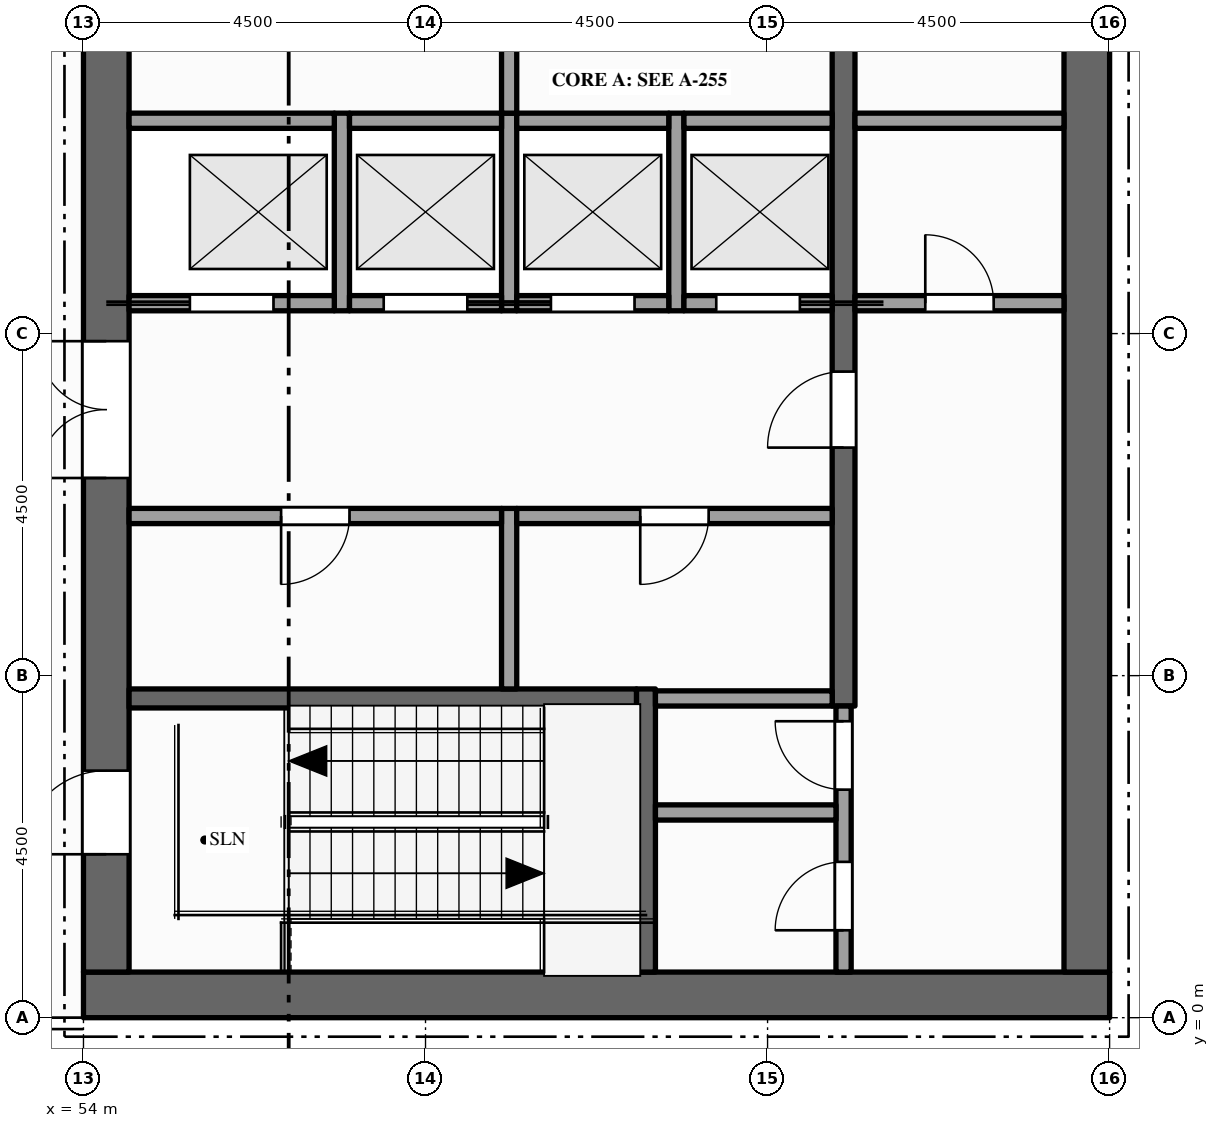
"""IFC4 building model, lengths in metres.
Left out: names, types, materials, properties, quantities, classifications, styles, units other than length and angle.
Written with IfcOpenShell. Run it as: python <this file> out.ifc"""

import sys

from ifc_helpers import new_model, si_unit, direction, frame, frame_2d, origin, place, context, subcontext, project, spatial, rectangle, extrude, element, fill, save


model = new_model("IFC4")
c1 = context("Model", 3, precision=1e-05, world=origin(), true_north=direction((0.0, 1.0)))
c2 = subcontext(c1, "Body", "Model", "MODEL_VIEW")
j1 = project(units=[si_unit("LENGTHUNIT", "METRE"), si_unit("PLANEANGLEUNIT", "RADIAN")], contexts=[c1])
p1 = place(None, origin())
s1 = spatial("IfcSite", under=j1, at=p1, CompositionType="ELEMENT")
p2 = place(p1, origin())
s2 = spatial("IfcBuilding", under=s1, at=p2, CompositionType="ELEMENT")
p3 = place(p2, frame((0.0, 0.0, 309.5)))
s3 = spatial("IfcBuildingStorey", under=s2, at=p3, CompositionType="ELEMENT", Elevation=309.5)
p4 = place(p3, frame((67.5, 0.3, -0.15), z_axis=(0.0, 0.0, 1.0), x_axis=(-1.0, 0.0, 0.0)))
e1 = element("IfcWall", 1, at=p4, inside=s3, PredefinedType="SHEAR", context=c2, shape_type="SweptSolid", body=[
    extrude(rectangle(XDim=13.5, YDim=0.6, at=frame_2d((6.75, 0.0))), origin(), (0.0, 0.0, 1.0), 4.5),
])
p5 = place(p3, frame((54.3, 0.6, -0.15), z_axis=(0.0, 0.0, 1.0), x_axis=(0.0, 1.0, 0.0)))
e2 = element("IfcWall", 2, at=p5, inside=s3, PredefinedType="SHEAR", context=c2, shape_type="SweptSolid", body=[
    extrude(rectangle(XDim=21.3, YDim=0.6, at=frame_2d((10.65, 0.0))), origin(), (0.0, 0.0, 1.0), 4.5),
])
p6 = place(p5, frame((6.5, 0.0, 0.15)))
e3 = element("IfcOpeningElement", 3, at=p6, cuts=e2, PredefinedType="OPENING", context=c2, shape_type="SweptSolid", body=[
    extrude(rectangle(XDim=1.8, YDim=2.1, at=frame_2d((0.9, 1.05))), frame((0.0, 0.31, 0.0), z_axis=(0.0, -1.0, 0.0), x_axis=(1.0, 0.0, 0.0)), (0.0, 0.0, 1.0), 0.62),
])
p7 = place(p5, frame((12.55, 0.0, 0.15)))
e4 = element("IfcOpeningElement", 4, at=p7, cuts=e2, PredefinedType="OPENING", context=c2, shape_type="SweptSolid", body=[
    extrude(rectangle(XDim=1.1, YDim=2.1, at=frame_2d((0.55, 1.05))), frame((0.0, 0.31, 0.0), z_axis=(0.0, -1.0, 0.0), x_axis=(1.0, 0.0, 0.0)), (0.0, 0.0, 1.0), 0.62),
])
p8 = place(p5, frame((1.55, 0.0, 0.15)))
e5 = element("IfcOpeningElement", 5, at=p8, cuts=e2, PredefinedType="OPENING", context=c2, shape_type="SweptSolid", body=[
    extrude(rectangle(XDim=1.1, YDim=2.1, at=frame_2d((0.55, 1.05))), frame((0.0, 0.31, 0.0), z_axis=(0.0, -1.0, 0.0), x_axis=(1.0, 0.0, 0.0)), (0.0, 0.0, 1.0), 0.62),
])
p9 = place(p5, frame((18.75, 0.0, 0.15)))
e6 = element("IfcOpeningElement", 6, at=p9, cuts=e2, PredefinedType="OPENING", context=c2, shape_type="SweptSolid", body=[
    extrude(rectangle(XDim=1.1, YDim=2.1, at=frame_2d((0.55, 1.05))), frame((0.0, 0.31, 0.0), z_axis=(0.0, -1.0, 0.0), x_axis=(1.0, 0.0, 0.0)), (0.0, 0.0, 1.0), 0.62),
])
p10 = place(p3, frame((67.2, 0.6, -0.15), z_axis=(0.0, 0.0, 1.0), x_axis=(0.0, 1.0, 0.0)))
e7 = element("IfcWall", 7, at=p10, inside=s3, PredefinedType="SHEAR", context=c2, shape_type="SweptSolid", body=[
    extrude(rectangle(XDim=21.3, YDim=0.6, at=frame_2d((10.65, 0.0))), origin(), (0.0, 0.0, 1.0), 4.5),
])
p11 = place(p3, frame((57.4, 9.3, 0.0), z_axis=(0.0, 0.0, 1.0), x_axis=(0.0, 1.0, 0.0)))
e8 = element("IfcWall", 8, at=p11, inside=s3, PredefinedType="SOLIDWALL", context=c2, shape_type="SweptSolid", body=[
    extrude(rectangle(XDim=2.6, YDim=0.2, at=frame_2d((1.3, 0.0))), origin(), (0.0, 0.0, 1.0), 4.35),
])
p12 = place(p3, frame((59.6, 4.325, 0.0), z_axis=(0.0, 0.0, 1.0), x_axis=(0.0, 1.0, 0.0)))
e9 = element("IfcWall", 9, at=p12, inside=s3, PredefinedType="PARTITIONING", context=c2, shape_type="SweptSolid", body=[
    extrude(rectangle(XDim=2.375, YDim=0.2, at=frame_2d((1.188, 0.0))), origin(), (0.0, 0.0, 1.0), 4.35),
])
p13 = place(p3, frame((59.6, 9.3, 0.0), z_axis=(0.0, 0.0, 1.0), x_axis=(0.0, 1.0, 0.0)))
e10 = element("IfcWall", 10, at=p13, inside=s3, PredefinedType="SOLIDWALL", context=c2, shape_type="SweptSolid", body=[
    extrude(rectangle(XDim=2.6, YDim=0.2, at=frame_2d((1.3, 0.0))), origin(), (0.0, 0.0, 1.0), 4.35),
])
p14 = place(p3, frame((59.6, 11.9, 0.0), z_axis=(0.0, 0.0, 1.0), x_axis=(0.0, 1.0, 0.0)))
e11 = element("IfcWall", 11, at=p14, inside=s3, PredefinedType="PARTITIONING", context=c2, shape_type="SweptSolid", body=[
    extrude(rectangle(XDim=3.6, YDim=0.2, at=frame_2d((1.8, 0.0))), origin(), (0.0, 0.0, 1.0), 4.35),
])
p15 = place(p14, frame((1.3, 0.0, 0.0)))
e12 = element("IfcOpeningElement", 12, at=p15, cuts=e11, PredefinedType="OPENING", context=c2, shape_type="SweptSolid", body=[
    extrude(rectangle(XDim=1.0, YDim=2.1, at=frame_2d((0.5, 1.05))), frame((0.0, 0.11, 0.0), z_axis=(0.0, -1.0, 0.0), x_axis=(1.0, 0.0, 0.0)), (0.0, 0.0, 1.0), 0.22),
])
p16 = place(p3, frame((61.4, 0.6, 0.0), z_axis=(0.0, 0.0, 1.0), x_axis=(0.0, 1.0, 0.0)))
e13 = element("IfcWall", 13, at=p16, inside=s3, PredefinedType="SHEAR", context=c2, shape_type="SweptSolid", body=[
    extrude(rectangle(XDim=3.725, YDim=0.25, at=frame_2d((1.862, 0.0))), origin(), (0.0, 0.0, 1.0), 4.35),
])
p17 = place(p3, frame((61.8, 9.3, 0.0), z_axis=(0.0, 0.0, 1.0), x_axis=(0.0, 1.0, 0.0)))
e14 = element("IfcWall", 14, at=p17, inside=s3, PredefinedType="SOLIDWALL", context=c2, shape_type="SweptSolid", body=[
    extrude(rectangle(XDim=2.6, YDim=0.2, at=frame_2d((1.3, 0.0))), origin(), (0.0, 0.0, 1.0), 4.35),
])
p18 = place(p3, frame((64.0, 0.6, 0.0), z_axis=(0.0, 0.0, 1.0), x_axis=(0.0, 1.0, 0.0)))
e15 = element("IfcWall", 15, at=p18, inside=s3, PredefinedType="PARTITIONING", context=c2, shape_type="SweptSolid", body=[
    extrude(rectangle(XDim=3.5, YDim=0.2, at=frame_2d((1.75, 0.0))), origin(), (0.0, 0.0, 1.0), 4.35),
])
p19 = place(p18, frame((0.55, 0.0, 0.0)))
e16 = element("IfcOpeningElement", 16, at=p19, cuts=e15, PredefinedType="OPENING", context=c2, shape_type="SweptSolid", body=[
    extrude(rectangle(XDim=0.9, YDim=2.1, at=frame_2d((0.45, 1.05))), frame((0.0, 0.11, 0.0), z_axis=(0.0, -1.0, 0.0), x_axis=(1.0, 0.0, 0.0)), (0.0, 0.0, 1.0), 0.22),
])
p20 = place(p18, frame((2.4, 0.0, 0.0)))
e17 = element("IfcOpeningElement", 17, at=p20, cuts=e15, PredefinedType="OPENING", context=c2, shape_type="SweptSolid", body=[
    extrude(rectangle(XDim=0.9, YDim=2.1, at=frame_2d((0.45, 1.05))), frame((0.0, 0.11, 0.0), z_axis=(0.0, -1.0, 0.0), x_axis=(1.0, 0.0, 0.0)), (0.0, 0.0, 1.0), 0.22),
])
p21 = place(p3, frame((64.0, 4.1, 0.0), z_axis=(0.0, 0.0, 1.0), x_axis=(0.0, 1.0, 0.0)))
e18 = element("IfcWall", 18, at=p21, inside=s3, PredefinedType="SHEAR", context=c2, shape_type="SweptSolid", body=[
    extrude(rectangle(XDim=14.5, YDim=0.3, at=frame_2d((7.25, 0.0))), origin(), (0.0, 0.0, 1.0), 4.35),
])
p22 = place(p21, frame((3.4, 0.0, 0.0)))
e19 = element("IfcOpeningElement", 19, at=p22, cuts=e18, PredefinedType="OPENING", context=c2, shape_type="SweptSolid", body=[
    extrude(rectangle(XDim=1.0, YDim=2.1, at=frame_2d((0.5, 1.05))), frame((0.0, 0.16, 0.0), z_axis=(0.0, -1.0, 0.0), x_axis=(1.0, 0.0, 0.0)), (0.0, 0.0, 1.0), 0.32),
])
p23 = place(p21, frame((9.1, 0.0, 0.0)))
e20 = element("IfcOpeningElement", 20, at=p23, cuts=e18, PredefinedType="OPENING", context=c2, shape_type="SweptSolid", body=[
    extrude(rectangle(XDim=1.0, YDim=2.1, at=frame_2d((0.5, 1.05))), frame((0.0, 0.16, 0.0), z_axis=(0.0, -1.0, 0.0), x_axis=(1.0, 0.0, 0.0)), (0.0, 0.0, 1.0), 0.32),
])
p24 = place(p3, frame((61.525, 2.7, 0.0), z_axis=(0.0, 0.0, 1.0), x_axis=(1.0, 0.0, 0.0)))
e21 = element("IfcWall", 21, at=p24, inside=s3, PredefinedType="PARTITIONING", context=c2, shape_type="SweptSolid", body=[
    extrude(rectangle(XDim=2.375, YDim=0.2, at=frame_2d((1.188, 0.0))), origin(), (0.0, 0.0, 1.0), 4.35),
])
p25 = place(p3, frame((54.6, 4.2, 0.0), z_axis=(0.0, 0.0, 1.0), x_axis=(1.0, 0.0, 0.0)))
e22 = element("IfcWall", 22, at=p25, inside=s3, PredefinedType="SHEAR", context=c2, shape_type="SweptSolid", body=[
    extrude(rectangle(XDim=6.675, YDim=0.25, at=frame_2d((3.337, 0.0))), origin(), (0.0, 0.0, 1.0), 4.35),
])
p26 = place(p3, frame((61.525, 4.2, 0.0), z_axis=(0.0, 0.0, 1.0), x_axis=(1.0, 0.0, 0.0)))
e23 = element("IfcWall", 23, at=p26, inside=s3, PredefinedType="PARTITIONING", context=c2, shape_type="SweptSolid", body=[
    extrude(rectangle(XDim=2.325, YDim=0.2, at=frame_2d((1.163, 0.0))), origin(), (0.0, 0.0, 1.0), 4.35),
])
p27 = place(p3, frame((54.6, 6.6, 0.0), z_axis=(0.0, 0.0, 1.0), x_axis=(1.0, 0.0, 0.0)))
e24 = element("IfcWall", 24, at=p27, inside=s3, PredefinedType="PARTITIONING", context=c2, shape_type="SweptSolid", body=[
    extrude(rectangle(XDim=4.9, YDim=0.2, at=frame_2d((2.45, 0.0))), origin(), (0.0, 0.0, 1.0), 4.35),
])
p28 = place(p27, frame((2.0, 0.0, 0.0)))
e25 = element("IfcOpeningElement", 25, at=p28, cuts=e24, PredefinedType="OPENING", context=c2, shape_type="SweptSolid", body=[
    extrude(rectangle(XDim=0.9, YDim=2.1, at=frame_2d((0.45, 1.05))), frame((0.0, 0.11, 0.0), z_axis=(0.0, -1.0, 0.0), x_axis=(1.0, 0.0, 0.0)), (0.0, 0.0, 1.0), 0.22),
])
p29 = place(p3, frame((59.7, 6.6, 0.0), z_axis=(0.0, 0.0, 1.0), x_axis=(1.0, 0.0, 0.0)))
e26 = element("IfcWall", 26, at=p29, inside=s3, PredefinedType="PARTITIONING", context=c2, shape_type="SweptSolid", body=[
    extrude(rectangle(XDim=4.15, YDim=0.2, at=frame_2d((2.075, 0.0))), origin(), (0.0, 0.0, 1.0), 4.35),
])
p30 = place(p29, frame((1.625, 0.0, 0.0)))
e27 = element("IfcOpeningElement", 27, at=p30, cuts=e26, PredefinedType="OPENING", context=c2, shape_type="SweptSolid", body=[
    extrude(rectangle(XDim=0.9, YDim=2.1, at=frame_2d((0.45, 1.05))), frame((0.0, 0.11, 0.0), z_axis=(0.0, -1.0, 0.0), x_axis=(1.0, 0.0, 0.0)), (0.0, 0.0, 1.0), 0.22),
])
p31 = place(p3, frame((54.6, 9.4, 0.0), z_axis=(0.0, 0.0, 1.0), x_axis=(1.0, 0.0, 0.0)))
e28 = element("IfcWall", 28, at=p31, inside=s3, PredefinedType="SOLIDWALL", context=c2, shape_type="SweptSolid", body=[
    extrude(rectangle(XDim=2.7, YDim=0.2, at=frame_2d((1.35, 0.0))), origin(), (0.0, 0.0, 1.0), 4.35),
])
p32 = place(p31, frame((0.8, 0.0, 0.012)))
e29 = element("IfcOpeningElement", 29, at=p32, cuts=e28, PredefinedType="OPENING", context=c2, shape_type="SweptSolid", body=[
    extrude(rectangle(XDim=1.1, YDim=2.1, at=frame_2d((0.55, 1.05))), frame((0.0, 0.11, 0.0), z_axis=(0.0, -1.0, 0.0), x_axis=(1.0, 0.0, 0.0)), (0.0, 0.0, 1.0), 0.22),
])
p33 = place(p3, frame((57.5, 9.4, 0.0), z_axis=(0.0, 0.0, 1.0), x_axis=(1.0, 0.0, 0.0)))
e30 = element("IfcWall", 30, at=p33, inside=s3, PredefinedType="SOLIDWALL", context=c2, shape_type="SweptSolid", body=[
    extrude(rectangle(XDim=2.0, YDim=0.2, at=frame_2d((1.0, 0.0))), origin(), (0.0, 0.0, 1.0), 4.35),
])
p34 = place(p33, frame((0.45, 0.0, 0.012)))
e31 = element("IfcOpeningElement", 31, at=p34, cuts=e30, PredefinedType="OPENING", context=c2, shape_type="SweptSolid", body=[
    extrude(rectangle(XDim=1.1, YDim=2.1, at=frame_2d((0.55, 1.05))), frame((0.0, 0.11, 0.0), z_axis=(0.0, -1.0, 0.0), x_axis=(1.0, 0.0, 0.0)), (0.0, 0.0, 1.0), 0.22),
])
p35 = place(p3, frame((59.7, 9.4, 0.0), z_axis=(0.0, 0.0, 1.0), x_axis=(1.0, 0.0, 0.0)))
e32 = element("IfcWall", 32, at=p35, inside=s3, PredefinedType="SOLIDWALL", context=c2, shape_type="SweptSolid", body=[
    extrude(rectangle(XDim=2.0, YDim=0.2, at=frame_2d((1.0, 0.0))), origin(), (0.0, 0.0, 1.0), 4.35),
])
p36 = place(p35, frame((0.45, 0.0, 0.012)))
e33 = element("IfcOpeningElement", 33, at=p36, cuts=e32, PredefinedType="OPENING", context=c2, shape_type="SweptSolid", body=[
    extrude(rectangle(XDim=1.1, YDim=2.1, at=frame_2d((0.55, 1.05))), frame((0.0, 0.11, 0.0), z_axis=(0.0, -1.0, 0.0), x_axis=(1.0, 0.0, 0.0)), (0.0, 0.0, 1.0), 0.22),
])
p37 = place(p3, frame((61.9, 9.4, 0.0), z_axis=(0.0, 0.0, 1.0), x_axis=(1.0, 0.0, 0.0)))
e34 = element("IfcWall", 34, at=p37, inside=s3, PredefinedType="SOLIDWALL", context=c2, shape_type="SweptSolid", body=[
    extrude(rectangle(XDim=1.95, YDim=0.2, at=frame_2d((0.975, 0.0))), origin(), (0.0, 0.0, 1.0), 4.35),
])
p38 = place(p37, frame((0.425, 0.0, 0.012)))
e35 = element("IfcOpeningElement", 35, at=p38, cuts=e34, PredefinedType="OPENING", context=c2, shape_type="SweptSolid", body=[
    extrude(rectangle(XDim=1.1, YDim=2.1, at=frame_2d((0.55, 1.05))), frame((0.0, 0.11, 0.0), z_axis=(0.0, -1.0, 0.0), x_axis=(1.0, 0.0, 0.0)), (0.0, 0.0, 1.0), 0.22),
])
p39 = place(p3, frame((64.15, 9.4, 0.0), z_axis=(0.0, 0.0, 1.0), x_axis=(1.0, 0.0, 0.0)))
e36 = element("IfcWall", 36, at=p39, inside=s3, PredefinedType="PARTITIONING", context=c2, shape_type="SweptSolid", body=[
    extrude(rectangle(XDim=2.75, YDim=0.2, at=frame_2d((1.375, 0.0))), origin(), (0.0, 0.0, 1.0), 4.35),
])
p40 = place(p39, frame((0.925, 0.0, 0.0)))
e37 = element("IfcOpeningElement", 37, at=p40, cuts=e36, PredefinedType="OPENING", context=c2, shape_type="SweptSolid", body=[
    extrude(rectangle(XDim=0.9, YDim=2.1, at=frame_2d((0.45, 1.05))), frame((0.0, 0.11, 0.0), z_axis=(0.0, -1.0, 0.0), x_axis=(1.0, 0.0, 0.0)), (0.0, 0.0, 1.0), 0.22),
])
p41 = place(p3, frame((54.6, 11.8, 0.0), z_axis=(0.0, 0.0, 1.0), x_axis=(1.0, 0.0, 0.0)))
e38 = element("IfcWall", 38, at=p41, inside=s3, PredefinedType="SOLIDWALL", context=c2, shape_type="SweptSolid", body=[
    extrude(rectangle(XDim=2.7, YDim=0.2, at=frame_2d((1.35, 0.0))), origin(), (0.0, 0.0, 1.0), 4.35),
])
for number, where, z_axis, x_axis in (
    (39, (57.5, 11.8, 0.0), (0.0, 0.0, 1.0), (1.0, 0.0, 0.0)),
    (40, (59.7, 11.8, 0.0), (0.0, 0.0, 1.0), (1.0, 0.0, 0.0)),
):
    element("IfcWall", number, at=place(p3, frame(where, z_axis=z_axis, x_axis=x_axis)), inside=s3, PredefinedType="SOLIDWALL", context=c2, shape_type="SweptSolid", body=[
        extrude(rectangle(XDim=2.0, YDim=0.2, at=frame_2d((1.0, 0.0))), origin(), (0.0, 0.0, 1.0), 4.35),
    ])
p42 = place(p3, frame((61.9, 11.8, 0.0), z_axis=(0.0, 0.0, 1.0), x_axis=(1.0, 0.0, 0.0)))
e41 = element("IfcWall", 41, at=p42, inside=s3, PredefinedType="SOLIDWALL", context=c2, shape_type="SweptSolid", body=[
    extrude(rectangle(XDim=1.95, YDim=0.2, at=frame_2d((0.975, 0.0))), origin(), (0.0, 0.0, 1.0), 4.35),
])
p43 = place(p3, frame((64.15, 11.8, 0.0), z_axis=(0.0, 0.0, 1.0), x_axis=(1.0, 0.0, 0.0)))
e42 = element("IfcWall", 42, at=p43, inside=s3, PredefinedType="PARTITIONING", context=c2, shape_type="SweptSolid", body=[
    extrude(rectangle(XDim=2.75, YDim=0.2, at=frame_2d((1.375, 0.0))), origin(), (0.0, 0.0, 1.0), 4.35),
])
p44 = place(p32, origin())
e43 = element("IfcDoor", 43, at=p44, inside=s3, OperationType="SLIDING_TO_LEFT", PredefinedType="DOOR", context=c2, shape_type="SweptSolid", body=[
    extrude(rectangle(XDim=1.1, YDim=2.1, at=frame_2d((0.55, 1.05))), frame((0.0, 0.025, 0.0), z_axis=(0.0, -1.0, 0.0), x_axis=(1.0, 0.0, 0.0)), (0.0, 0.0, 1.0), 0.05),
])
fill(e29, e43)
p45 = place(p34, origin())
e44 = element("IfcDoor", 44, at=p45, inside=s3, OperationType="SLIDING_TO_RIGHT", PredefinedType="DOOR", context=c2, shape_type="SweptSolid", body=[
    extrude(rectangle(XDim=1.1, YDim=2.1, at=frame_2d((0.55, 1.05))), frame((0.0, 0.025, 0.0), z_axis=(0.0, -1.0, 0.0), x_axis=(1.0, 0.0, 0.0)), (0.0, 0.0, 1.0), 0.05),
])
fill(e31, e44)
p46 = place(p36, origin())
e45 = element("IfcDoor", 45, at=p46, inside=s3, OperationType="SLIDING_TO_LEFT", PredefinedType="DOOR", context=c2, shape_type="SweptSolid", body=[
    extrude(rectangle(XDim=1.1, YDim=2.1, at=frame_2d((0.55, 1.05))), frame((0.0, 0.025, 0.0), z_axis=(0.0, -1.0, 0.0), x_axis=(1.0, 0.0, 0.0)), (0.0, 0.0, 1.0), 0.05),
])
fill(e33, e45)
p47 = place(p38, origin())
e46 = element("IfcDoor", 46, at=p47, inside=s3, OperationType="SLIDING_TO_RIGHT", PredefinedType="DOOR", context=c2, shape_type="SweptSolid", body=[
    extrude(rectangle(XDim=1.1, YDim=2.1, at=frame_2d((0.55, 1.05))), frame((0.0, 0.025, 0.0), z_axis=(0.0, -1.0, 0.0), x_axis=(1.0, 0.0, 0.0)), (0.0, 0.0, 1.0), 0.05),
])
fill(e35, e46)
p48 = place(p6, origin())
e47 = element("IfcDoor", 47, at=p48, inside=s3, OperationType="DOUBLE_DOOR_SINGLE_SWING", PredefinedType="DOOR", context=c2, shape_type="SweptSolid", body=[
    extrude(rectangle(XDim=1.8, YDim=2.1, at=frame_2d((0.9, 1.05))), frame((0.0, 0.025, 0.0), z_axis=(0.0, -1.0, 0.0), x_axis=(1.0, 0.0, 0.0)), (0.0, 0.0, 1.0), 0.05),
])
fill(e3, e47)
p49 = place(p22, origin())
e48 = element("IfcDoor", 48, at=p49, inside=s3, OperationType="SINGLE_SWING_LEFT", PredefinedType="DOOR", context=c2, shape_type="SweptSolid", body=[
    extrude(rectangle(XDim=1.0, YDim=2.1, at=frame_2d((0.5, 1.05))), frame((0.0, 0.025, 0.0), z_axis=(0.0, -1.0, 0.0), x_axis=(1.0, 0.0, 0.0)), (0.0, 0.0, 1.0), 0.05),
])
fill(e19, e48)
p50 = place(p40, origin())
e49 = element("IfcDoor", 49, at=p50, inside=s3, OperationType="SINGLE_SWING_LEFT", PredefinedType="DOOR", context=c2, shape_type="SweptSolid", body=[
    extrude(rectangle(XDim=0.9, YDim=2.1, at=frame_2d((0.45, 1.05))), frame((0.0, 0.025, 0.0), z_axis=(0.0, -1.0, 0.0), x_axis=(1.0, 0.0, 0.0)), (0.0, 0.0, 1.0), 0.05),
])
fill(e37, e49)
p51 = place(p8, origin())
e50 = element("IfcDoor", 50, at=p51, inside=s3, OperationType="SINGLE_SWING_LEFT", PredefinedType="DOOR", context=c2, shape_type="SweptSolid", body=[
    extrude(rectangle(XDim=1.1, YDim=2.1, at=frame_2d((0.55, 1.05))), frame((0.0, 0.025, 0.0), z_axis=(0.0, -1.0, 0.0), x_axis=(1.0, 0.0, 0.0)), (0.0, 0.0, 1.0), 0.05),
])
fill(e5, e50)
p52 = place(p19, origin())
e51 = element("IfcDoor", 51, at=p52, inside=s3, OperationType="SINGLE_SWING_LEFT", PredefinedType="DOOR", context=c2, shape_type="SweptSolid", body=[
    extrude(rectangle(XDim=0.9, YDim=2.1, at=frame_2d((0.45, 1.05))), frame((0.0, 0.025, 0.0), z_axis=(0.0, -1.0, 0.0), x_axis=(1.0, 0.0, 0.0)), (0.0, 0.0, 1.0), 0.05),
])
fill(e16, e51)
p53 = place(p20, origin())
e52 = element("IfcDoor", 52, at=p53, inside=s3, OperationType="SINGLE_SWING_RIGHT", PredefinedType="DOOR", context=c2, shape_type="SweptSolid", body=[
    extrude(rectangle(XDim=0.9, YDim=2.1, at=frame_2d((0.45, 1.05))), frame((0.0, 0.025, 0.0), z_axis=(0.0, -1.0, 0.0), x_axis=(1.0, 0.0, 0.0)), (0.0, 0.0, 1.0), 0.05),
])
fill(e17, e52)
p54 = place(p28, origin())
e53 = element("IfcDoor", 53, at=p54, inside=s3, OperationType="SINGLE_SWING_LEFT", PredefinedType="DOOR", context=c2, shape_type="SweptSolid", body=[
    extrude(rectangle(XDim=0.9, YDim=2.1, at=frame_2d((0.45, 1.05))), frame((0.0, 0.025, 0.0), z_axis=(0.0, -1.0, 0.0), x_axis=(1.0, 0.0, 0.0)), (0.0, 0.0, 1.0), 0.05),
])
fill(e25, e53)
p55 = place(p30, origin())
e54 = element("IfcDoor", 54, at=p55, inside=s3, OperationType="SINGLE_SWING_LEFT", PredefinedType="DOOR", context=c2, shape_type="SweptSolid", body=[
    extrude(rectangle(XDim=0.9, YDim=2.1, at=frame_2d((0.45, 1.05))), frame((0.0, 0.025, 0.0), z_axis=(0.0, -1.0, 0.0), x_axis=(1.0, 0.0, 0.0)), (0.0, 0.0, 1.0), 0.05),
])
fill(e27, e54)
save(model, sys.argv[1])
